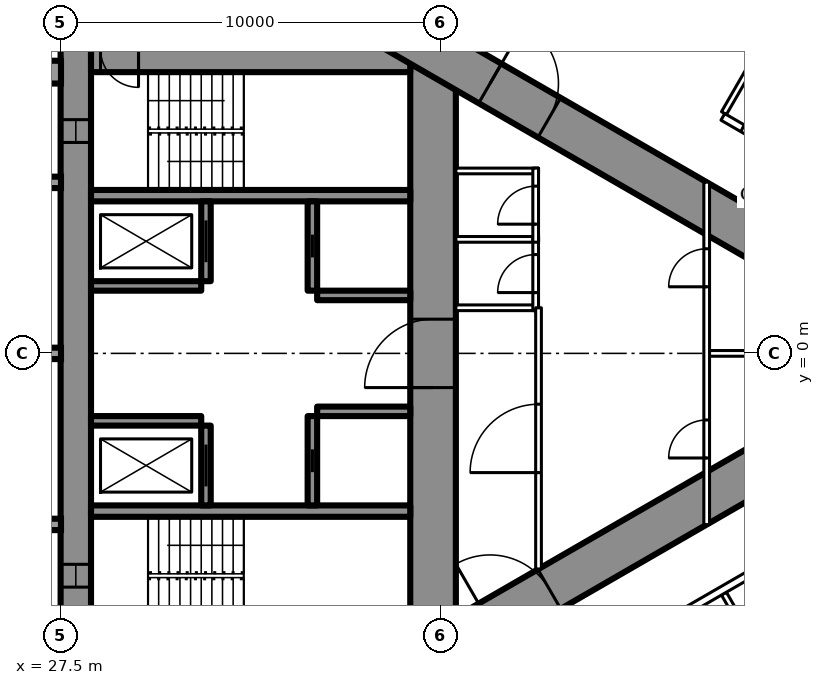
"""IFC4 building model, lengths in metres.
Left out: names, types, materials, properties, quantities, classifications, styles, units other than length and angle.
Written with IfcOpenShell. Run it as: python <this file> out.ifc"""

import sys

from ifc_helpers import new_model, si_unit, direction, frame, frame_2d, origin, place, context, subcontext, project, spatial, rectangle, extrude, element, fill, save


model = new_model("IFC4")
c1 = context("Model", 3, precision=1e-05, world=origin(), true_north=direction((0.0, 1.0)))
c2 = subcontext(c1, "Body", "Model", "MODEL_VIEW")
j1 = project(units=[si_unit("LENGTHUNIT", "METRE"), si_unit("PLANEANGLEUNIT", "RADIAN")], contexts=[c1])
p1 = place(None, origin())
s1 = spatial("IfcSite", under=j1, at=p1, CompositionType="ELEMENT")
p2 = place(p1, origin())
s2 = spatial("IfcBuilding", under=s1, at=p2, CompositionType="ELEMENT")
p3 = place(p2, frame((0.0, 0.0, 111.6)))
s3 = spatial("IfcBuildingStorey", under=s2, at=p3, CompositionType="ELEMENT", Elevation=111.6)
p4 = place(p3, frame((27.9, -8.6, 0.0), z_axis=(0.0, 0.0, 1.0), x_axis=(0.0, 1.0, 0.0)))
e1 = element("IfcWall", 1, at=p4, inside=s3, PredefinedType="SHEAR", context=c2, shape_type="SweptSolid", body=[
    extrude(rectangle(XDim=17.2, YDim=0.8, at=frame_2d((8.6, 0.0))), origin(), (0.0, 0.0, 1.0), 3.5),
])
p5 = place(p4, frame((2.45, 0.0, 0.6)))
e2 = element("IfcOpeningElement", 2, at=p5, cuts=e1, PredefinedType="OPENING", context=c2, shape_type="SweptSolid", body=[
    extrude(rectangle(XDim=0.6, YDim=2.1, at=frame_2d((0.3, 1.05))), frame((0.0, 0.41, 0.0), z_axis=(0.0, -1.0, 0.0), x_axis=(1.0, 0.0, 0.0)), (0.0, 0.0, 1.0), 0.82),
])
p6 = place(p4, frame((14.15, 0.0, 0.6)))
e3 = element("IfcOpeningElement", 3, at=p6, cuts=e1, PredefinedType="OPENING", context=c2, shape_type="SweptSolid", body=[
    extrude(rectangle(XDim=0.6, YDim=2.1, at=frame_2d((0.3, 1.05))), frame((0.0, 0.41, 0.0), z_axis=(0.0, -1.0, 0.0), x_axis=(1.0, 0.0, 0.0)), (0.0, 0.0, 1.0), 0.82),
])
p7 = place(p3, frame((37.3, -8.6, 0.0), z_axis=(0.0, 0.0, 1.0), x_axis=(0.0, 1.0, 0.0)))
e4 = element("IfcWall", 4, at=p7, inside=s3, PredefinedType="SHEAR", context=c2, shape_type="SweptSolid", body=[
    extrude(rectangle(XDim=17.2, YDim=1.2, at=frame_2d((8.6, 0.0))), origin(), (0.0, 0.0, 1.0), 3.5),
])
p8 = place(p7, frame((7.7, 0.0, 0.0)))
e5 = element("IfcOpeningElement", 5, at=p8, cuts=e4, PredefinedType="OPENING", context=c2, shape_type="SweptSolid", body=[
    extrude(rectangle(XDim=1.8, YDim=2.2, at=frame_2d((0.9, 1.1))), frame((0.0, 0.61, 0.0), z_axis=(0.0, -1.0, 0.0), x_axis=(1.0, 0.0, 0.0)), (0.0, 0.0, 1.0), 1.22),
])
p9 = place(p3, frame((28.3, 8.0, 0.0), z_axis=(0.0, 0.0, 1.0), x_axis=(1.0, 0.0, 0.0)))
e6 = element("IfcWall", 6, at=p9, inside=s3, PredefinedType="SHEAR", context=c2, shape_type="SweptSolid", body=[
    extrude(rectangle(XDim=8.4, YDim=1.2, at=frame_2d((4.2, 0.0))), origin(), (0.0, 0.0, 1.0), 3.5),
])
p10 = place(p9, frame((0.25, 0.0, 0.0)))
e7 = element("IfcOpeningElement", 7, at=p10, cuts=e6, PredefinedType="OPENING", context=c2, shape_type="SweptSolid", body=[
    extrude(rectangle(XDim=1.0, YDim=2.2, at=frame_2d((0.5, 1.1))), frame((0.0, 0.61, 0.0), z_axis=(0.0, -1.0, 0.0), x_axis=(1.0, 0.0, 0.0)), (0.0, 0.0, 1.0), 1.22),
])
for number, where, z_axis, x_axis in (
    (8, (28.3, -4.15, 0.0), (0.0, 0.0, 1.0), (1.0, 0.0, 0.0)),
    (9, (28.3, 4.15, 0.0), (0.0, 0.0, 1.0), (1.0, 0.0, 0.0)),
):
    element("IfcWall", number, at=place(p3, frame(where, z_axis=z_axis, x_axis=x_axis)), inside=s3, PredefinedType="SHEAR", context=c2, shape_type="SweptSolid", body=[
        extrude(rectangle(XDim=8.4, YDim=0.3, at=frame_2d((4.2, 0.0))), origin(), (0.0, 0.0, 1.0), 3.5),
    ])
p11 = place(p3, frame((31.325, -4.0, 0.0), z_axis=(0.0, 0.0, 1.0), x_axis=(0.0, 1.0, 0.0)))
e10 = element("IfcWall", 10, at=p11, inside=s3, PredefinedType="SHEAR", context=c2, shape_type="SweptSolid", body=[
    extrude(rectangle(XDim=2.1, YDim=0.25, at=frame_2d((1.05, 0.0))), origin(), (0.0, 0.0, 1.0), 3.5),
])
p12 = place(p11, frame((0.5, 0.0, 0.0)))
e11 = element("IfcOpeningElement", 11, at=p12, cuts=e10, PredefinedType="OPENING", context=c2, shape_type="SweptSolid", body=[
    extrude(rectangle(XDim=1.1, YDim=2.2, at=frame_2d((0.55, 1.1))), frame((0.0, 0.135, 0.0), z_axis=(0.0, -1.0, 0.0), x_axis=(1.0, 0.0, 0.0)), (0.0, 0.0, 1.0), 0.27),
])
p13 = place(p3, frame((34.125, -4.0, 0.0), z_axis=(0.0, 0.0, 1.0), x_axis=(0.0, 1.0, 0.0)))
e12 = element("IfcWall", 12, at=p13, inside=s3, PredefinedType="SHEAR", context=c2, shape_type="SweptSolid", body=[
    extrude(rectangle(XDim=2.35, YDim=0.25, at=frame_2d((1.175, 0.0))), origin(), (0.0, 0.0, 1.0), 3.5),
])
p14 = place(p13, frame((0.875, 0.0, 0.0)))
e13 = element("IfcOpeningElement", 13, at=p14, cuts=e12, PredefinedType="OPENING", context=c2, shape_type="SweptSolid", body=[
    extrude(rectangle(XDim=0.6, YDim=2.0, at=frame_2d((0.3, 1.0))), frame((0.0, 0.135, 0.0), z_axis=(0.0, -1.0, 0.0), x_axis=(1.0, 0.0, 0.0)), (0.0, 0.0, 1.0), 0.27),
])
p15 = place(p3, frame((28.3, -1.775, 0.0), z_axis=(0.0, 0.0, 1.0), x_axis=(1.0, 0.0, 0.0)))
e14 = element("IfcWall", 14, at=p15, inside=s3, PredefinedType="SHEAR", context=c2, shape_type="SweptSolid", body=[
    extrude(rectangle(XDim=2.9, YDim=0.25, at=frame_2d((1.45, 0.0))), origin(), (0.0, 0.0, 1.0), 3.5),
])
p16 = place(p3, frame((34.25, -1.525, 0.0), z_axis=(0.0, 0.0, 1.0), x_axis=(1.0, 0.0, 0.0)))
e15 = element("IfcWall", 15, at=p16, inside=s3, PredefinedType="SHEAR", context=c2, shape_type="SweptSolid", body=[
    extrude(rectangle(XDim=2.45, YDim=0.25, at=frame_2d((1.225, 0.0))), origin(), (0.0, 0.0, 1.0), 3.5),
])
p17 = place(p3, frame((31.325, 1.9, 0.0), z_axis=(0.0, 0.0, 1.0), x_axis=(0.0, 1.0, 0.0)))
e16 = element("IfcWall", 16, at=p17, inside=s3, PredefinedType="SHEAR", context=c2, shape_type="SweptSolid", body=[
    extrude(rectangle(XDim=2.1, YDim=0.25, at=frame_2d((1.05, 0.0))), origin(), (0.0, 0.0, 1.0), 3.5),
])
p18 = place(p17, frame((0.5, 0.0, 0.0)))
e17 = element("IfcOpeningElement", 17, at=p18, cuts=e16, PredefinedType="OPENING", context=c2, shape_type="SweptSolid", body=[
    extrude(rectangle(XDim=1.1, YDim=2.2, at=frame_2d((0.55, 1.1))), frame((0.0, 0.135, 0.0), z_axis=(0.0, -1.0, 0.0), x_axis=(1.0, 0.0, 0.0)), (0.0, 0.0, 1.0), 0.27),
])
p19 = place(p3, frame((34.125, 1.65, 0.0), z_axis=(0.0, 0.0, 1.0), x_axis=(0.0, 1.0, 0.0)))
e18 = element("IfcWall", 18, at=p19, inside=s3, PredefinedType="SHEAR", context=c2, shape_type="SweptSolid", body=[
    extrude(rectangle(XDim=2.35, YDim=0.25, at=frame_2d((1.175, 0.0))), origin(), (0.0, 0.0, 1.0), 3.5),
])
p20 = place(p19, frame((0.875, 0.0, 0.0)))
e19 = element("IfcOpeningElement", 19, at=p20, cuts=e18, PredefinedType="OPENING", context=c2, shape_type="SweptSolid", body=[
    extrude(rectangle(XDim=0.6, YDim=2.0, at=frame_2d((0.3, 1.0))), frame((0.0, 0.135, 0.0), z_axis=(0.0, -1.0, 0.0), x_axis=(1.0, 0.0, 0.0)), (0.0, 0.0, 1.0), 0.27),
])
p21 = place(p3, frame((28.3, 1.775, 0.0), z_axis=(0.0, 0.0, 1.0), x_axis=(1.0, 0.0, 0.0)))
e20 = element("IfcWall", 20, at=p21, inside=s3, PredefinedType="SHEAR", context=c2, shape_type="SweptSolid", body=[
    extrude(rectangle(XDim=2.9, YDim=0.25, at=frame_2d((1.45, 0.0))), origin(), (0.0, 0.0, 1.0), 3.5),
])
p22 = place(p3, frame((34.25, 1.525, 0.0), z_axis=(0.0, 0.0, 1.0), x_axis=(1.0, 0.0, 0.0)))
e21 = element("IfcWall", 21, at=p22, inside=s3, PredefinedType="SHEAR", context=c2, shape_type="SweptSolid", body=[
    extrude(rectangle(XDim=2.45, YDim=0.25, at=frame_2d((1.225, 0.0))), origin(), (0.0, 0.0, 1.0), 3.5),
])
p23 = place(p3, frame((27.2, -13.8, 0.0), z_axis=(0.0, 0.0, 1.0), x_axis=(0.866027159892, 0.499996958321, 0.0)))
e22 = element("IfcWall", 22, at=p23, inside=s3, PredefinedType="SHEAR", context=c2, shape_type="SweptSolid", body=[
    extrude(rectangle(XDim=27.947, YDim=1.2, at=frame_2d((13.973, 0.0))), origin(), (0.0, 0.0, 1.0), 3.5),
])
p24 = place(p23, frame((4.6, 0.0, 0.0)))
e23 = element("IfcOpeningElement", 23, at=p24, cuts=e22, PredefinedType="OPENING", context=c2, shape_type="SweptSolid", body=[
    extrude(rectangle(XDim=1.0, YDim=2.2, at=frame_2d((0.5, 1.1))), frame((0.0, 0.61, 0.0), z_axis=(0.0, -1.0, 0.0), x_axis=(1.0, 0.0, 0.0)), (0.0, 0.0, 1.0), 1.22),
])
p25 = place(p23, frame((13.395, 0.0, 0.0)))
e24 = element("IfcOpeningElement", 24, at=p25, cuts=e22, PredefinedType="OPENING", context=c2, shape_type="SweptSolid", body=[
    extrude(rectangle(XDim=1.8, YDim=2.2, at=frame_2d((0.9, 1.1))), frame((0.0, 0.61, 0.0), z_axis=(0.0, -1.0, 0.0), x_axis=(1.0, 0.0, 0.0)), (0.0, 0.0, 1.0), 1.22),
])
p26 = place(p3, frame((27.2, 13.8, 0.0), z_axis=(0.0, 0.0, 1.0), x_axis=(0.866024515034, -0.500001539357, 0.0)))
e25 = element("IfcWall", 25, at=p26, inside=s3, PredefinedType="SHEAR", context=c2, shape_type="SweptSolid", body=[
    extrude(rectangle(XDim=26.907, YDim=1.2, at=frame_2d((13.454, 0.0))), origin(), (0.0, 0.0, 1.0), 3.5),
])
p27 = place(p26, frame((4.6, 0.0, 0.0)))
e26 = element("IfcOpeningElement", 26, at=p27, cuts=e25, PredefinedType="OPENING", context=c2, shape_type="SweptSolid", body=[
    extrude(rectangle(XDim=1.0, YDim=2.2, at=frame_2d((0.5, 1.1))), frame((0.0, 0.61, 0.0), z_axis=(0.0, -1.0, 0.0), x_axis=(1.0, 0.0, 0.0)), (0.0, 0.0, 1.0), 1.22),
])
p28 = place(p26, frame((13.395, 0.0, 0.0)))
e27 = element("IfcOpeningElement", 27, at=p28, cuts=e25, PredefinedType="OPENING", context=c2, shape_type="SweptSolid", body=[
    extrude(rectangle(XDim=1.8, YDim=2.2, at=frame_2d((0.9, 1.1))), frame((0.0, 0.61, 0.0), z_axis=(0.0, -1.0, 0.0), x_axis=(1.0, 0.0, 0.0)), (0.0, 0.0, 1.0), 1.22),
])
p29 = place(p3, frame((44.954, -6.321, 0.0), z_axis=(0.0, 0.0, 1.0), x_axis=(0.500018676722, -0.866014620505, 0.0)))
e28 = element("IfcWall", 28, at=p29, inside=s3, PredefinedType="PARTITIONING", context=c2, shape_type="SweptSolid", body=[
    extrude(rectangle(XDim=8.704, YDim=0.15, at=frame_2d((4.352, 0.0))), origin(), (0.0, 0.0, 1.0), 2.2),
])
p30 = place(p3, frame((44.954, 6.321, 0.0), z_axis=(0.0, 0.0, 1.0), x_axis=(0.500009815811, 0.866019736549, 0.0)))
e29 = element("IfcWall", 29, at=p30, inside=s3, PredefinedType="PARTITIONING", context=c2, shape_type="SweptSolid", body=[
    extrude(rectangle(XDim=11.424, YDim=0.15, at=frame_2d((5.712, 0.0))), origin(), (0.0, 0.0, 1.0), 3.25),
])
p31 = place(p3, frame((37.96, -10.243, 0.0), z_axis=(0.0, 0.0, 1.0), x_axis=(0.866026429433, 0.499998223521, 0.0)))
e30 = element("IfcWall", 30, at=p31, inside=s3, PredefinedType="PARTITIONING", context=c2, shape_type="SweptSolid", body=[
    extrude(rectangle(XDim=20.487, YDim=0.2, at=frame_2d((10.243, 0.0))), origin(), (0.0, 0.0, 1.0), 3.25),
])
p32 = place(p31, frame((4.343, 0.0, 0.0)))
e31 = element("IfcOpeningElement", 31, at=p32, cuts=e30, PredefinedType="OPENING", context=c2, shape_type="SweptSolid", body=[
    extrude(rectangle(XDim=0.95, YDim=2.2, at=frame_2d((0.475, 1.1))), frame((0.0, 0.11, 0.0), z_axis=(0.0, -1.0, 0.0), x_axis=(1.0, 0.0, 0.0)), (0.0, 0.0, 1.0), 0.22),
])
p33 = place(p31, frame((15.385, 0.0, 0.0)))
e32 = element("IfcOpeningElement", 32, at=p33, cuts=e30, PredefinedType="OPENING", context=c2, shape_type="SweptSolid", body=[
    extrude(rectangle(XDim=0.95, YDim=2.2, at=frame_2d((0.475, 1.1))), frame((0.0, 0.11, 0.0), z_axis=(0.0, -1.0, 0.0), x_axis=(1.0, 0.0, 0.0)), (0.0, 0.0, 1.0), 0.22),
])
p34 = place(p31, frame((17.085, 0.0, 0.0)))
e33 = element("IfcOpeningElement", 33, at=p34, cuts=e30, PredefinedType="OPENING", context=c2, shape_type="SweptSolid", body=[
    extrude(rectangle(XDim=0.95, YDim=2.2, at=frame_2d((0.475, 1.1))), frame((0.0, 0.11, 0.0), z_axis=(0.0, -1.0, 0.0), x_axis=(1.0, 0.0, 0.0)), (0.0, 0.0, 1.0), 0.22),
])
p35 = place(p31, frame((1.048, 0.0, 0.0)))
e34 = element("IfcOpeningElement", 34, at=p35, cuts=e30, PredefinedType="OPENING", context=c2, shape_type="SweptSolid", body=[
    extrude(rectangle(XDim=1.8, YDim=2.2, at=frame_2d((0.9, 1.1))), frame((0.0, 0.11, 0.0), z_axis=(0.0, -1.0, 0.0), x_axis=(1.0, 0.0, 0.0)), (0.0, 0.0, 1.0), 0.22),
])
p36 = place(p3, frame((44.925, 6.222, 0.0), z_axis=(0.0, 0.0, 1.0), x_axis=(0.866025590081, -0.499999677325, 0.0)))
e35 = element("IfcWall", 35, at=p36, inside=s3, PredefinedType="PARTITIONING", context=c2, shape_type="SweptSolid", body=[
    extrude(rectangle(XDim=12.324, YDim=0.2, at=frame_2d((6.162, 0.0))), origin(), (0.0, 0.0, 1.0), 3.25),
])
p37 = place(p36, frame((9.042, 0.0, 0.0)))
e36 = element("IfcOpeningElement", 36, at=p37, cuts=e35, PredefinedType="OPENING", context=c2, shape_type="SweptSolid", body=[
    extrude(rectangle(XDim=0.95, YDim=2.2, at=frame_2d((0.475, 1.1))), frame((0.0, 0.11, 0.0), z_axis=(0.0, -1.0, 0.0), x_axis=(1.0, 0.0, 0.0)), (0.0, 0.0, 1.0), 0.22),
])
p38 = place(p36, frame((7.342, 0.0, 0.0)))
e37 = element("IfcOpeningElement", 37, at=p38, cuts=e35, PredefinedType="OPENING", context=c2, shape_type="SweptSolid", body=[
    extrude(rectangle(XDim=0.95, YDim=2.2, at=frame_2d((0.475, 1.1))), frame((0.0, 0.11, 0.0), z_axis=(0.0, -1.0, 0.0), x_axis=(1.0, 0.0, 0.0)), (0.0, 0.0, 1.0), 0.22),
])
p39 = place(p36, frame((0.6, 0.0, 0.0)))
e38 = element("IfcOpeningElement", 38, at=p39, cuts=e35, PredefinedType="OPENING", context=c2, shape_type="SweptSolid", body=[
    extrude(rectangle(XDim=0.95, YDim=2.2, at=frame_2d((0.475, 1.1))), frame((0.0, 0.11, 0.0), z_axis=(0.0, -1.0, 0.0), x_axis=(1.0, 0.0, 0.0)), (0.0, 0.0, 1.0), 0.22),
])
for number, where, z_axis, x_axis in (
    (39, (37.9, 1.2, 0.0), (0.0, 0.0, 1.0), (1.0, 0.0, 0.0)),
    (40, (37.9, 3.0, 0.0), (0.0, 0.0, 1.0), (1.0, 0.0, 0.0)),
    (41, (37.9, 4.8, 0.0), (0.0, 0.0, 1.0), (1.0, 0.0, 0.0)),
):
    element("IfcWall", number, at=place(p3, frame(where, z_axis=z_axis, x_axis=x_axis)), inside=s3, PredefinedType="PARTITIONING", context=c2, shape_type="SweptSolid", body=[
        extrude(rectangle(XDim=2.175, YDim=0.15, at=frame_2d((1.087, 0.0))), origin(), (0.0, 0.0, 1.0), 3.25),
    ])
p40 = place(p3, frame((40.0, 1.125, 0.0), z_axis=(0.0, 0.0, 1.0), x_axis=(0.0, 1.0, 0.0)))
e42 = element("IfcWall", 42, at=p40, inside=s3, PredefinedType="PARTITIONING", context=c2, shape_type="SweptSolid", body=[
    extrude(rectangle(XDim=1.95, YDim=0.15, at=frame_2d((0.975, 0.0))), origin(), (0.0, 0.0, 1.0), 3.25),
])
p41 = place(p40, frame((0.475, 0.0, 0.0)))
e43 = element("IfcOpeningElement", 43, at=p41, cuts=e42, PredefinedType="OPENING", context=c2, shape_type="SweptSolid", body=[
    extrude(rectangle(XDim=1.0, YDim=2.2, at=frame_2d((0.5, 1.1))), frame((0.0, 0.085, 0.0), z_axis=(0.0, -1.0, 0.0), x_axis=(1.0, 0.0, 0.0)), (0.0, 0.0, 1.0), 0.17),
])
p42 = place(p3, frame((40.0, 2.925, 0.0), z_axis=(0.0, 0.0, 1.0), x_axis=(0.0, 1.0, 0.0)))
e44 = element("IfcWall", 44, at=p42, inside=s3, PredefinedType="PARTITIONING", context=c2, shape_type="SweptSolid", body=[
    extrude(rectangle(XDim=1.95, YDim=0.15, at=frame_2d((0.975, 0.0))), origin(), (0.0, 0.0, 1.0), 3.25),
])
p43 = place(p42, frame((0.475, 0.0, 0.0)))
e45 = element("IfcOpeningElement", 45, at=p43, cuts=e44, PredefinedType="OPENING", context=c2, shape_type="SweptSolid", body=[
    extrude(rectangle(XDim=1.0, YDim=2.2, at=frame_2d((0.5, 1.1))), frame((0.0, 0.085, 0.0), z_axis=(0.0, -1.0, 0.0), x_axis=(1.0, 0.0, 0.0)), (0.0, 0.0, 1.0), 0.17),
])
p44 = place(p3, frame((40.075, -5.674, 0.0), z_axis=(0.0, 0.0, 1.0), x_axis=(0.0, 1.0, 0.0)))
e46 = element("IfcWall", 46, at=p44, inside=s3, PredefinedType="PARTITIONING", context=c2, shape_type="SweptSolid", body=[
    extrude(rectangle(XDim=6.874, YDim=0.15, at=frame_2d((3.437, 0.0))), origin(), (0.0, 0.0, 1.0), 3.25),
])
p45 = place(p44, frame((2.537, 0.0, 0.0)))
e47 = element("IfcOpeningElement", 47, at=p45, cuts=e46, PredefinedType="OPENING", context=c2, shape_type="SweptSolid", body=[
    extrude(rectangle(XDim=1.8, YDim=2.2, at=frame_2d((0.9, 1.1))), frame((0.0, 0.085, 0.0), z_axis=(0.0, -1.0, 0.0), x_axis=(1.0, 0.0, 0.0)), (0.0, 0.0, 1.0), 0.17),
])
p46 = place(p3, frame((44.5, -4.505, 0.0), z_axis=(0.0, 0.0, 1.0), x_axis=(0.0, 1.0, 0.0)))
e48 = element("IfcWall", 48, at=p46, inside=s3, PredefinedType="PARTITIONING", context=c2, shape_type="SweptSolid", body=[
    extrude(rectangle(XDim=9.009, YDim=0.15, at=frame_2d((4.505, 0.0))), origin(), (0.0, 0.0, 1.0), 2.45),
])
p47 = place(p46, frame((1.752, 0.0, 0.0)))
e49 = element("IfcOpeningElement", 49, at=p47, cuts=e48, PredefinedType="OPENING", context=c2, shape_type="SweptSolid", body=[
    extrude(rectangle(XDim=1.0, YDim=2.2, at=frame_2d((0.5, 1.1))), frame((0.0, 0.085, 0.0), z_axis=(0.0, -1.0, 0.0), x_axis=(1.0, 0.0, 0.0)), (0.0, 0.0, 1.0), 0.17),
])
p48 = place(p46, frame((6.257, 0.0, 0.0)))
e50 = element("IfcOpeningElement", 50, at=p48, cuts=e48, PredefinedType="OPENING", context=c2, shape_type="SweptSolid", body=[
    extrude(rectangle(XDim=1.0, YDim=2.2, at=frame_2d((0.5, 1.1))), frame((0.0, 0.085, 0.0), z_axis=(0.0, -1.0, 0.0), x_axis=(1.0, 0.0, 0.0)), (0.0, 0.0, 1.0), 0.17),
])
p49 = place(p3, frame((44.575, 0.0, 0.0), z_axis=(0.0, 0.0, 1.0), x_axis=(1.0, 0.0, 0.0)))
e51 = element("IfcWall", 51, at=p49, inside=s3, PredefinedType="PARTITIONING", context=c2, shape_type="SweptSolid", body=[
    extrude(rectangle(XDim=7.727, YDim=0.15, at=frame_2d((3.864, 0.0))), origin(), (0.0, 0.0, 1.0), 2.2),
])
p50 = place(p39, origin())
e52 = element("IfcDoor", 52, at=p50, inside=s3, OperationType="SINGLE_SWING_LEFT", PredefinedType="DOOR", context=c2, shape_type="SweptSolid", body=[
    extrude(rectangle(XDim=0.95, YDim=2.2, at=frame_2d((0.475, 1.1))), frame((0.0, 0.025, 0.0), z_axis=(0.0, -1.0, 0.0), x_axis=(1.0, 0.0, 0.0)), (0.0, 0.0, 1.0), 0.05),
])
fill(e38, e52)
p51 = place(p41, origin())
e53 = element("IfcDoor", 53, at=p51, inside=s3, OperationType="SINGLE_SWING_LEFT", PredefinedType="DOOR", context=c2, shape_type="SweptSolid", body=[
    extrude(rectangle(XDim=1.0, YDim=2.2, at=frame_2d((0.5, 1.1))), frame((0.0, 0.025, 0.0), z_axis=(0.0, -1.0, 0.0), x_axis=(1.0, 0.0, 0.0)), (0.0, 0.0, 1.0), 0.05),
])
fill(e43, e53)
p52 = place(p43, origin())
e54 = element("IfcDoor", 54, at=p52, inside=s3, OperationType="SINGLE_SWING_LEFT", PredefinedType="DOOR", context=c2, shape_type="SweptSolid", body=[
    extrude(rectangle(XDim=1.0, YDim=2.2, at=frame_2d((0.5, 1.1))), frame((0.0, 0.025, 0.0), z_axis=(0.0, -1.0, 0.0), x_axis=(1.0, 0.0, 0.0)), (0.0, 0.0, 1.0), 0.05),
])
fill(e45, e54)
p53 = place(p45, origin())
e55 = element("IfcDoor", 55, at=p53, inside=s3, OperationType="DOUBLE_DOOR_SINGLE_SWING", PredefinedType="DOOR", context=c2, shape_type="SweptSolid", body=[
    extrude(rectangle(XDim=1.8, YDim=2.2, at=frame_2d((0.9, 1.1))), frame((0.0, 0.025, 0.0), z_axis=(0.0, -1.0, 0.0), x_axis=(1.0, 0.0, 0.0)), (0.0, 0.0, 1.0), 0.05),
])
fill(e47, e55)
p54 = place(p47, origin())
e56 = element("IfcDoor", 56, at=p54, inside=s3, OperationType="SINGLE_SWING_LEFT", PredefinedType="DOOR", context=c2, shape_type="SweptSolid", body=[
    extrude(rectangle(XDim=1.0, YDim=2.2, at=frame_2d((0.5, 1.1))), frame((0.0, 0.025, 0.0), z_axis=(0.0, -1.0, 0.0), x_axis=(1.0, 0.0, 0.0)), (0.0, 0.0, 1.0), 0.05),
])
fill(e49, e56)
p55 = place(p48, origin())
e57 = element("IfcDoor", 57, at=p55, inside=s3, OperationType="SINGLE_SWING_LEFT", PredefinedType="DOOR", context=c2, shape_type="SweptSolid", body=[
    extrude(rectangle(XDim=1.0, YDim=2.2, at=frame_2d((0.5, 1.1))), frame((0.0, 0.025, 0.0), z_axis=(0.0, -1.0, 0.0), x_axis=(1.0, 0.0, 0.0)), (0.0, 0.0, 1.0), 0.05),
])
fill(e50, e57)
p56 = place(p25, origin())
e58 = element("IfcDoor", 58, at=p56, inside=s3, OperationType="DOUBLE_DOOR_SINGLE_SWING", PredefinedType="DOOR", context=c2, shape_type="SweptSolid", body=[
    extrude(rectangle(XDim=1.8, YDim=2.2, at=frame_2d((0.9, 1.1))), frame((0.0, 0.025, 0.0), z_axis=(0.0, -1.0, 0.0), x_axis=(1.0, 0.0, 0.0)), (0.0, 0.0, 1.0), 0.05),
])
fill(e24, e58)
p57 = place(p28, origin())
e59 = element("IfcDoor", 59, at=p57, inside=s3, OperationType="DOUBLE_DOOR_SINGLE_SWING", PredefinedType="DOOR", context=c2, shape_type="SweptSolid", body=[
    extrude(rectangle(XDim=1.8, YDim=2.2, at=frame_2d((0.9, 1.1))), frame((0.0, 0.025, 0.0), z_axis=(0.0, -1.0, 0.0), x_axis=(1.0, 0.0, 0.0)), (0.0, 0.0, 1.0), 0.05),
])
fill(e27, e59)
p58 = place(p8, origin())
e60 = element("IfcDoor", 60, at=p58, inside=s3, OperationType="DOUBLE_DOOR_SINGLE_SWING", PredefinedType="DOOR", context=c2, shape_type="SweptSolid", body=[
    extrude(rectangle(XDim=1.8, YDim=2.2, at=frame_2d((0.9, 1.1))), frame((0.0, 0.025, 0.0), z_axis=(0.0, -1.0, 0.0), x_axis=(1.0, 0.0, 0.0)), (0.0, 0.0, 1.0), 0.05),
])
fill(e5, e60)
p59 = place(p12, origin())
e61 = element("IfcDoor", 61, at=p59, inside=s3, OperationType="SLIDING_TO_LEFT", PredefinedType="USERDEFINED", context=c2, shape_type="SweptSolid", body=[
    extrude(rectangle(XDim=1.1, YDim=2.2, at=frame_2d((0.55, 1.1))), frame((0.0, 0.025, 0.0), z_axis=(0.0, -1.0, 0.0), x_axis=(1.0, 0.0, 0.0)), (0.0, 0.0, 1.0), 0.05),
])
fill(e11, e61)
p60 = place(p18, origin())
e62 = element("IfcDoor", 62, at=p60, inside=s3, OperationType="SLIDING_TO_LEFT", PredefinedType="USERDEFINED", context=c2, shape_type="SweptSolid", body=[
    extrude(rectangle(XDim=1.1, YDim=2.2, at=frame_2d((0.55, 1.1))), frame((0.0, 0.025, 0.0), z_axis=(0.0, -1.0, 0.0), x_axis=(1.0, 0.0, 0.0)), (0.0, 0.0, 1.0), 0.05),
])
fill(e17, e62)
p61 = place(p14, origin())
e63 = element("IfcDoor", 63, at=p61, inside=s3, OperationType="SLIDING_TO_LEFT", PredefinedType="DOOR", context=c2, shape_type="SweptSolid", body=[
    extrude(rectangle(XDim=0.6, YDim=2.0, at=frame_2d((0.3, 1.0))), frame((0.0, 0.025, 0.0), z_axis=(0.0, -1.0, 0.0), x_axis=(1.0, 0.0, 0.0)), (0.0, 0.0, 1.0), 0.05),
])
fill(e13, e63)
p62 = place(p20, origin())
e64 = element("IfcDoor", 64, at=p62, inside=s3, OperationType="SLIDING_TO_LEFT", PredefinedType="DOOR", context=c2, shape_type="SweptSolid", body=[
    extrude(rectangle(XDim=0.6, YDim=2.0, at=frame_2d((0.3, 1.0))), frame((0.0, 0.025, 0.0), z_axis=(0.0, -1.0, 0.0), x_axis=(1.0, 0.0, 0.0)), (0.0, 0.0, 1.0), 0.05),
])
fill(e19, e64)
p63 = place(p5, origin())
e65 = element("IfcWindow", 65, at=p63, inside=s3, PartitioningType="SINGLE_PANEL", PredefinedType="WINDOW", context=c2, shape_type="SweptSolid", body=[
    extrude(rectangle(XDim=0.6, YDim=2.1, at=frame_2d((0.3, 1.05))), frame((0.0, 0.03, 0.0), z_axis=(0.0, -1.0, 0.0), x_axis=(1.0, 0.0, 0.0)), (0.0, 0.0, 1.0), 0.06),
])
fill(e2, e65)
p64 = place(p6, origin())
e66 = element("IfcWindow", 66, at=p64, inside=s3, PartitioningType="SINGLE_PANEL", PredefinedType="WINDOW", context=c2, shape_type="SweptSolid", body=[
    extrude(rectangle(XDim=0.6, YDim=2.1, at=frame_2d((0.3, 1.05))), frame((0.0, 0.03, 0.0), z_axis=(0.0, -1.0, 0.0), x_axis=(1.0, 0.0, 0.0)), (0.0, 0.0, 1.0), 0.06),
])
fill(e3, e66)
save(model, sys.argv[1])
